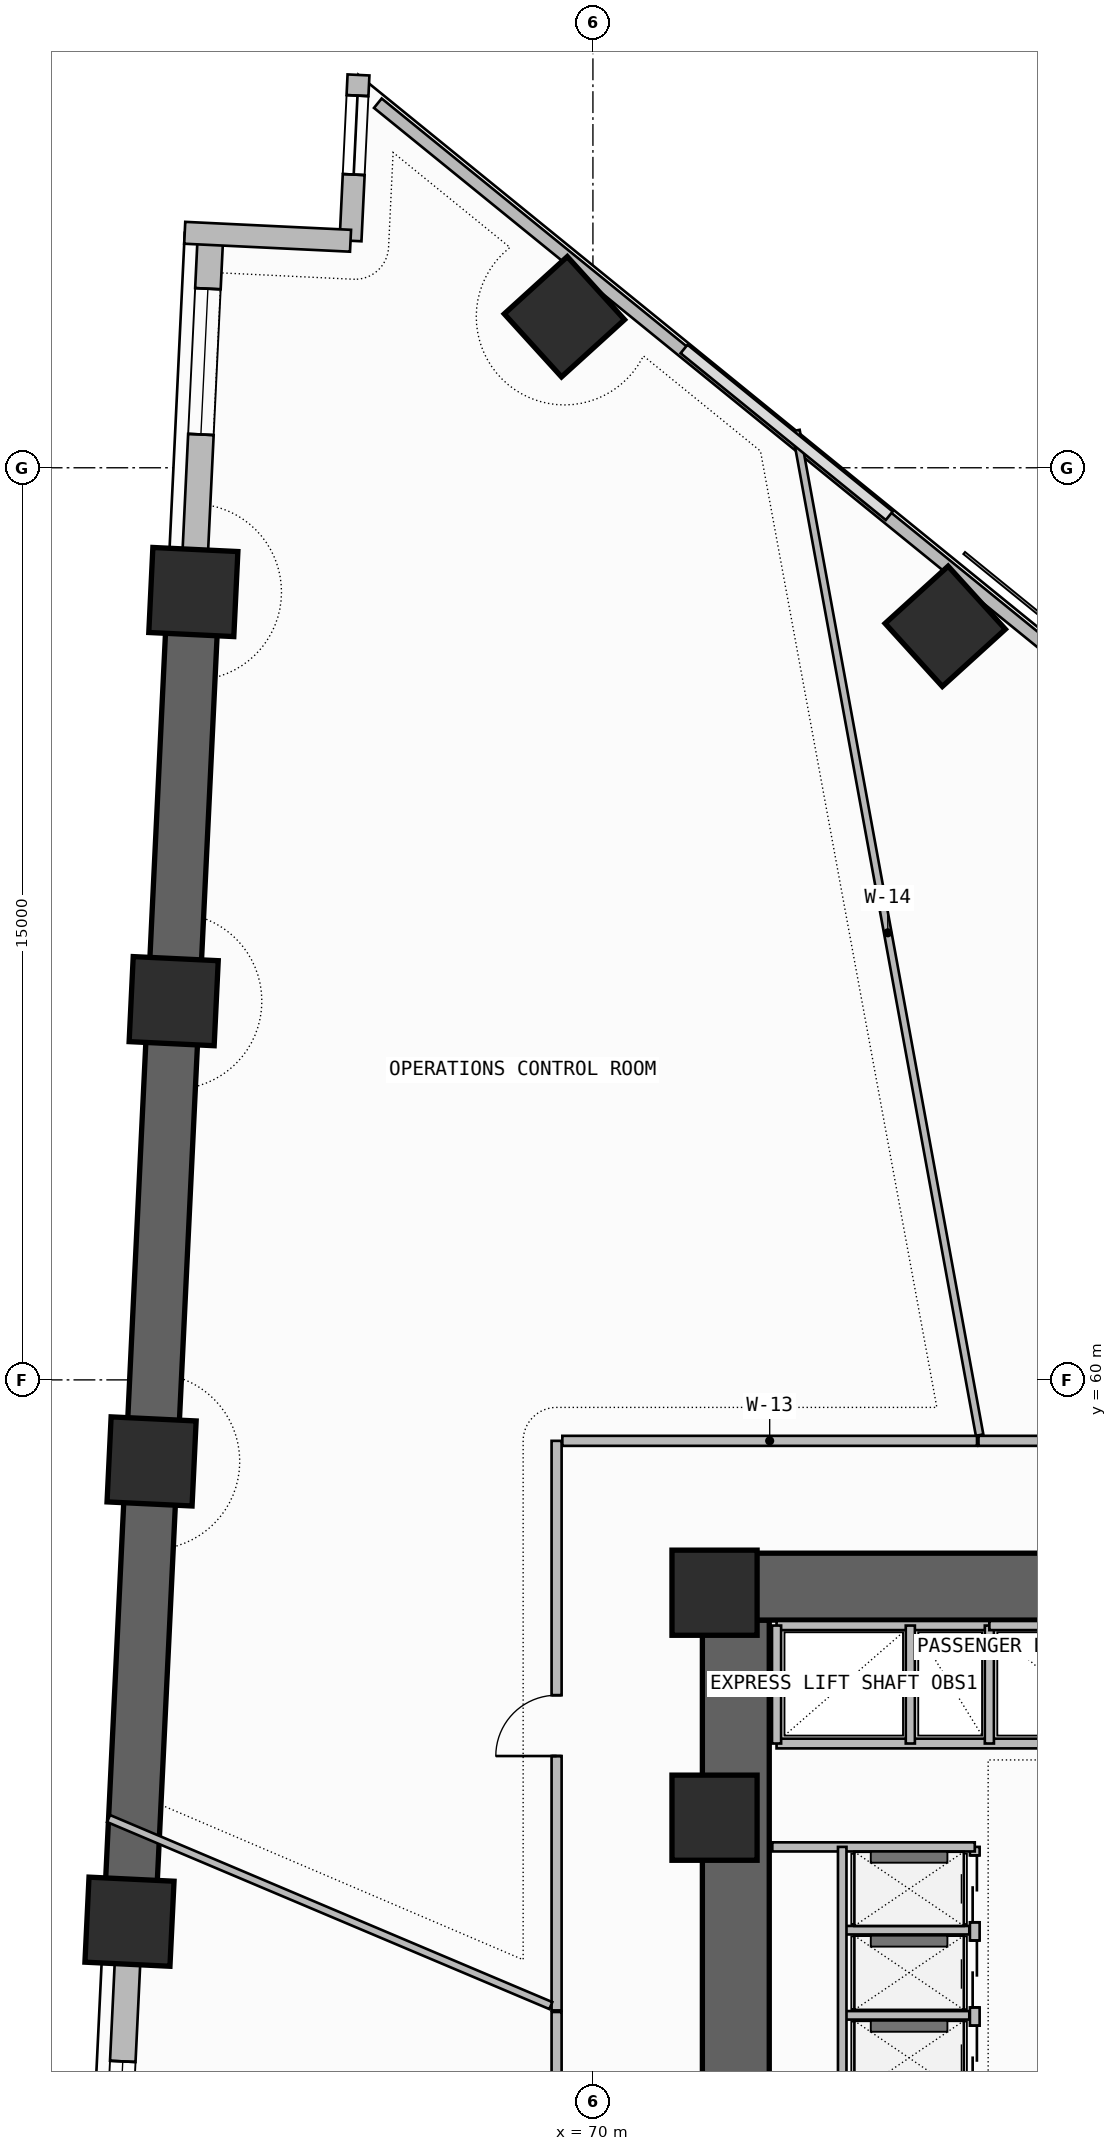
"""IFC4 building model, lengths in metres.
Left out: names, types, materials, properties, quantities, classifications, styles, units other than length and angle.
Written with IfcOpenShell. Run it as: python <this file> out.ifc"""

import sys

from ifc_helpers import new_model, si_unit, direction, frame, frame_2d, origin, origin_2d, place, context, subcontext, project, spatial, rectangle, extrude, element, fill, save


model = new_model("IFC4")
c1 = context("Model", 3, precision=1e-05, world=origin(), true_north=direction((0.0, 1.0)))
c2 = subcontext(c1, "Body", "Model", "MODEL_VIEW")
j1 = project(units=[si_unit("LENGTHUNIT", "METRE"), si_unit("PLANEANGLEUNIT", "RADIAN")], contexts=[c1])
p1 = place(None, origin())
s1 = spatial("IfcSite", under=j1, at=p1, CompositionType="ELEMENT")
p2 = place(p1, origin())
s2 = spatial("IfcBuilding", under=s1, at=p2, CompositionType="ELEMENT")
p3 = place(p2, frame((0.0, 0.0, 30.3)))
s3 = spatial("IfcBuildingStorey", under=s2, at=p3, CompositionType="ELEMENT", Elevation=30.3)
p4 = place(p3, frame((72.35, 43.35, -0.2), z_axis=(0.0, 0.0, 1.0), x_axis=(0.0, 1.0, 0.0)))
e1 = element("IfcWall", 1, at=p4, inside=s3, PredefinedType="SHEAR", context=c2, shape_type="SweptSolid", body=[
    extrude(rectangle(XDim=12.7, YDim=1.1, at=frame_2d((6.35, 0.0))), origin(), (0.0, 0.0, 1.0), 3.6),
])
p5 = place(p4, frame((1.35, 0.0, 0.2)))
e2 = element("IfcOpeningElement", 2, at=p5, cuts=e1, PredefinedType="OPENING", context=c2, shape_type="SweptSolid", body=[
    extrude(rectangle(XDim=1.2, YDim=2.2, at=frame_2d((0.6, 1.1))), frame((0.0, 0.56, 0.0), z_axis=(0.0, -1.0, 0.0), x_axis=(1.0, 0.0, 0.0)), (0.0, 0.0, 1.0), 1.12),
])
p6 = place(p3, frame((71.8, 56.6, -0.2), z_axis=(0.0, 0.0, 1.0), x_axis=(1.0, 0.0, 0.0)))
e3 = element("IfcWall", 3, at=p6, inside=s3, PredefinedType="SHEAR", context=c2, shape_type="SweptSolid", body=[
    extrude(rectangle(XDim=14.3, YDim=1.1, at=frame_2d((7.15, 0.0))), origin(), (0.0, 0.0, 1.0), 3.6),
])
for number, where, z_axis, x_axis in (
    (4, (72.0, 52.8, 0.0), (0.0, 0.0, 1.0), (1.0, 0.0, 0.0)),
    (5, (72.0, 56.5, 0.0), (0.0, 0.0, 1.0), (1.0, 0.0, 0.0)),
    (6, (75.794, 72.392, 0.0), (0.0, 0.0, 1.0), (0.74, 0.672, 0.0)),
    (7, (69.531, 77.483, 0.0), (0.0, 0.0, 1.0), (0.74, 0.672, 0.0)),
    (8, (63.428, 72.957, 0.0), (0.0, 0.0, 1.0), (0.048, 0.999, 0.0)),
    (9, (63.105, 66.228, 0.0), (0.0, 0.0, 1.0), (0.048, 0.999, 0.0)),
    (10, (62.742, 58.659, 0.0), (0.0, 0.0, 1.0), (0.048, 0.999, 0.0)),
    (11, (62.378, 51.09, 0.0), (0.0, 0.0, 1.0), (0.048, 0.999, 0.0)),
):
    element("IfcColumn", number, at=place(p3, frame(where, z_axis=z_axis, x_axis=x_axis)), inside=s3, PredefinedType="COLUMN", context=c2, shape_type="SweptSolid", body=[
        extrude(rectangle(XDim=1.4, YDim=1.4, at=origin_2d()), origin(), (0.0, 0.0, 1.0), 3.6),
    ])
p7 = place(p3, frame((63.711, 78.844, 0.0), z_axis=(0.0, 0.0, 1.0), x_axis=(-0.048007946398, -0.998846953784, 0.0)))
e12 = element("IfcWall", 12, at=p7, inside=s3, PredefinedType="SOLIDWALL", context=c2, shape_type="SweptSolid", body=[
    extrude(rectangle(XDim=5.894, YDim=0.42, at=frame_2d((2.947, 0.0))), origin(), (0.0, 0.0, 1.0), 2.385),
])
p8 = place(p7, frame((0.9, 0.0, 1.2)))
e13 = element("IfcOpeningElement", 13, at=p8, cuts=e12, PredefinedType="OPENING", context=c2, shape_type="SweptSolid", body=[
    extrude(rectangle(XDim=2.4, YDim=0.9, at=frame_2d((1.2, 0.45))), frame((0.0, 0.22, 0.0), z_axis=(0.0, -1.0, 0.0), x_axis=(1.0, 0.0, 0.0)), (0.0, 0.0, 1.0), 0.44),
])
p9 = place(p3, frame((63.428, 72.957, -0.2), z_axis=(0.0, 0.0, 1.0), x_axis=(-0.047976309476, -0.998848473858, 0.0)))
e14 = element("IfcWall", 14, at=p9, inside=s3, PredefinedType="SHEAR", context=c2, shape_type="SweptSolid", body=[
    extrude(rectangle(XDim=21.892, YDim=0.85, at=frame_2d((10.946, 0.0))), origin(), (0.0, 0.0, 1.0), 3.6),
])
p10 = place(p3, frame((62.378, 51.09, 0.0), z_axis=(0.0, 0.0, 1.0), x_axis=(-0.047978424452, -0.99884837227, 0.0)))
e15 = element("IfcWall", 15, at=p10, inside=s3, PredefinedType="SOLIDWALL", context=c2, shape_type="SweptSolid", body=[
    extrude(rectangle(XDim=14.314, YDim=0.42, at=frame_2d((7.157, 0.0))), origin(), (0.0, 0.0, 1.0), 2.385),
])
p11 = place(p10, frame((2.3, 0.0, 1.2)))
e16 = element("IfcOpeningElement", 16, at=p11, cuts=e15, PredefinedType="OPENING", context=c2, shape_type="SweptSolid", body=[
    extrude(rectangle(XDim=2.4, YDim=0.9, at=frame_2d((1.2, 0.45))), frame((0.0, 0.22, 0.0), z_axis=(0.0, -1.0, 0.0), x_axis=(1.0, 0.0, 0.0)), (0.0, 0.0, 1.0), 0.44),
])
p12 = place(p3, frame((66.144, 81.46, 0.0), z_axis=(0.0, 0.0, 1.0), x_axis=(-0.047934806162, -0.998850466465, 0.0)))
e17 = element("IfcWall", 17, at=p12, inside=s3, PredefinedType="SOLIDWALL", context=c2, shape_type="SweptSolid", body=[
    extrude(rectangle(XDim=2.73, YDim=0.36, at=frame_2d((1.365, 0.0))), origin(), (0.0, 0.0, 1.0), 3.4),
])
p13 = place(p12, frame((0.34, 0.0, 0.45)))
e18 = element("IfcOpeningElement", 18, at=p13, cuts=e17, PredefinedType="OPENING", context=c2, shape_type="SweptSolid", body=[
    extrude(rectangle(XDim=1.3, YDim=2.4, at=frame_2d((0.65, 1.2))), frame((0.0, 0.19, 0.0), z_axis=(0.0, -1.0, 0.0), x_axis=(1.0, 0.0, 0.0)), (0.0, 0.0, 1.0), 0.38),
])
p14 = place(p3, frame((66.013, 78.733, 0.0), z_axis=(0.0, 0.0, 1.0), x_axis=(-0.998846180588, 0.048024030708, 0.0)))
e19 = element("IfcWall", 19, at=p14, inside=s3, PredefinedType="SOLIDWALL", context=c2, shape_type="SweptSolid", body=[
    extrude(rectangle(XDim=2.73, YDim=0.36, at=frame_2d((1.365, 0.0))), origin(), (0.0, 0.0, 1.0), 3.4),
])
p15 = place(p3, frame((94.513, 58.196, 0.0), z_axis=(0.0, 0.0, 1.0), x_axis=(-0.776001602097, 0.630730935933, 0.0)))
e20 = element("IfcWall", 20, at=p15, inside=s3, PredefinedType="PARAPET", context=c2, shape_type="SweptSolid", body=[
    extrude(rectangle(XDim=36.148, YDim=0.2, at=frame_2d((18.074, 0.0))), origin(), (0.0, 0.0, 1.0), 1.15),
])
p16 = place(p3, frame((76.28, 47.18, 0.0), z_axis=(0.0, 0.0, 1.0), x_axis=(0.0, 1.0, 0.0)))
e21 = element("IfcWall", 21, at=p16, inside=s3, PredefinedType="SOLIDWALL", context=c2, shape_type="SweptSolid", body=[
    extrude(rectangle(XDim=5.14, YDim=0.16, at=frame_2d((2.57, 0.0))), origin(), (0.0, 0.0, 1.0), 3.4),
])
p17 = place(p16, frame((1.1, 0.0, 0.0)))
e22 = element("IfcOpeningElement", 22, at=p17, cuts=e21, PredefinedType="OPENING", context=c2, shape_type="SweptSolid", body=[
    extrude(rectangle(XDim=1.1, YDim=2.25, at=frame_2d((0.55, 1.125))), frame((0.0, 0.09, 0.0), z_axis=(0.0, -1.0, 0.0), x_axis=(1.0, 0.0, 0.0)), (0.0, 0.0, 1.0), 0.18),
])
p18 = place(p16, frame((2.5, 0.0, 0.0)))
e23 = element("IfcOpeningElement", 23, at=p18, cuts=e21, PredefinedType="OPENING", context=c2, shape_type="SweptSolid", body=[
    extrude(rectangle(XDim=1.1, YDim=2.25, at=frame_2d((0.55, 1.125))), frame((0.0, 0.09, 0.0), z_axis=(0.0, -1.0, 0.0), x_axis=(1.0, 0.0, 0.0)), (0.0, 0.0, 1.0), 0.18),
])
p19 = place(p16, frame((3.9, 0.0, 0.0)))
e24 = element("IfcOpeningElement", 24, at=p19, cuts=e21, PredefinedType="OPENING", context=c2, shape_type="SweptSolid", body=[
    extrude(rectangle(XDim=1.1, YDim=2.25, at=frame_2d((0.55, 1.125))), frame((0.0, 0.09, 0.0), z_axis=(0.0, -1.0, 0.0), x_axis=(1.0, 0.0, 0.0)), (0.0, 0.0, 1.0), 0.18),
])
p20 = place(p16, frame((0.12, 0.0, 0.0)))
e25 = element("IfcOpeningElement", 25, at=p20, cuts=e21, PredefinedType="OPENING", context=c2, shape_type="SweptSolid", body=[
    extrude(rectangle(XDim=0.85, YDim=2.05, at=frame_2d((0.425, 1.025))), frame((0.0, 0.09, 0.0), z_axis=(0.0, -1.0, 0.0), x_axis=(1.0, 0.0, 0.0)), (0.0, 0.0, 1.0), 0.18),
])
p21 = place(p3, frame((72.95, 52.32, 0.0), z_axis=(0.0, 0.0, 1.0), x_axis=(1.0, 0.0, 0.0)))
e26 = element("IfcWall", 26, at=p21, inside=s3, PredefinedType="SOLIDWALL", context=c2, shape_type="SweptSolid", body=[
    extrude(rectangle(XDim=3.33, YDim=0.15, at=frame_2d((1.665, 0.0))), origin(), (0.0, 0.0, 1.0), 3.4),
])
for number, where, z_axis, x_axis in (
    (27, (74.15, 49.55, 0.0), (0.0, 0.0, 1.0), (1.0, 0.0, 0.0)),
    (28, (74.15, 50.95, 0.0), (0.0, 0.0, 1.0), (1.0, 0.0, 0.0)),
):
    element("IfcWall", number, at=place(p3, frame(where, z_axis=z_axis, x_axis=x_axis)), inside=s3, PredefinedType="PLUMBINGWALL", context=c2, shape_type="SweptSolid", body=[
        extrude(rectangle(XDim=2.04, YDim=0.14, at=frame_2d((1.02, 0.0))), origin(), (0.0, 0.0, 1.0), 3.4),
    ])
p22 = place(p3, frame((74.1, 48.16, 0.0), z_axis=(0.0, 0.0, 1.0), x_axis=(0.0, 1.0, 0.0)))
e29 = element("IfcWall", 29, at=p22, inside=s3, PredefinedType="PLUMBINGWALL", context=c2, shape_type="SweptSolid", body=[
    extrude(rectangle(XDim=4.16, YDim=0.14, at=frame_2d((2.08, 0.0))), origin(), (0.0, 0.0, 1.0), 3.4),
])
p23 = place(p3, frame((73.02, 54.02, 0.0), z_axis=(0.0, 0.0, 1.0), x_axis=(1.0, 0.0, 0.0)))
e30 = element("IfcWall", 30, at=p23, inside=s3, PredefinedType="SOLIDWALL", context=c2, shape_type="SweptSolid", body=[
    extrude(rectangle(XDim=12.08, YDim=0.16, at=frame_2d((6.04, 0.0))), origin(), (0.0, 0.0, 1.0), 3.4),
])
p24 = place(p3, frame((73.02, 55.96, 0.0), z_axis=(0.0, 0.0, 1.0), x_axis=(1.0, 0.0, 0.0)))
e31 = element("IfcWall", 31, at=p24, inside=s3, PredefinedType="SOLIDWALL", context=c2, shape_type="SweptSolid", body=[
    extrude(rectangle(XDim=3.5, YDim=0.15, at=frame_2d((1.75, 0.0))), origin(), (0.0, 0.0, 1.0), 3.4),
])
p25 = place(p3, frame((73.02, 54.02, 0.0), z_axis=(0.0, 0.0, 1.0), x_axis=(0.0, 1.0, 0.0)))
e32 = element("IfcWall", 32, at=p25, inside=s3, PredefinedType="PLUMBINGWALL", context=c2, shape_type="SweptSolid", body=[
    extrude(rectangle(XDim=1.94, YDim=0.15, at=frame_2d((0.97, 0.0))), origin(), (0.0, 0.0, 1.0), 3.4),
])
p26 = place(p3, frame((76.52, 54.02, 0.0), z_axis=(0.0, 0.0, 1.0), x_axis=(0.0, 1.0, 0.0)))
e33 = element("IfcWall", 33, at=p26, inside=s3, PredefinedType="SOLIDWALL", context=c2, shape_type="SweptSolid", body=[
    extrude(rectangle(XDim=1.94, YDim=0.15, at=frame_2d((0.97, 0.0))), origin(), (0.0, 0.0, 1.0), 3.4),
])
p27 = place(p3, frame((75.22, 54.02, 0.0), z_axis=(0.0, 0.0, 1.0), x_axis=(0.0, 1.0, 0.0)))
e34 = element("IfcWall", 34, at=p27, inside=s3, PredefinedType="PLUMBINGWALL", context=c2, shape_type="SweptSolid", body=[
    extrude(rectangle(XDim=1.94, YDim=0.15, at=frame_2d((0.97, 0.0))), origin(), (0.0, 0.0, 1.0), 3.4),
])
p28 = place(p3, frame((76.52, 55.96, 0.0), z_axis=(0.0, 0.0, 1.0), x_axis=(1.0, 0.0, 0.0)))
e35 = element("IfcWall", 35, at=p28, inside=s3, PredefinedType="SOLIDWALL", context=c2, shape_type="SweptSolid", body=[
    extrude(rectangle(XDim=6.7, YDim=0.15, at=frame_2d((3.35, 0.0))), origin(), (0.0, 0.0, 1.0), 3.4),
])
p29 = place(p3, frame((85.598, 58.998, 0.0), z_axis=(0.0, 0.0, 1.0), x_axis=(-1.0, 0.0, 0.0)))
e36 = element("IfcWall", 36, at=p29, inside=s3, PredefinedType="PARTITIONING", context=c2, shape_type="SweptSolid", body=[
    extrude(rectangle(XDim=9.257, YDim=0.165, at=frame_2d((4.628, 0.0))), origin(), (0.0, 0.0, 1.0), 2.785),
])
p30 = place(p29, frame((4.128, 0.0, 0.0)))
e37 = element("IfcOpeningElement", 37, at=p30, cuts=e36, PredefinedType="OPENING", context=c2, shape_type="SweptSolid", body=[
    extrude(rectangle(XDim=1.0, YDim=2.2, at=frame_2d((0.5, 1.1))), frame((0.0, 0.093, 0.0), z_axis=(0.0, -1.0, 0.0), x_axis=(1.0, 0.0, 0.0)), (0.0, 0.0, 1.0), 0.185),
])
p31 = place(p3, frame((76.36, 59.092, 0.0), z_axis=(0.0, 0.0, 1.0), x_axis=(-0.179880606562, 0.983688450366, 0.0)))
e38 = element("IfcWall", 38, at=p31, inside=s3, PredefinedType="PARTITIONING", context=c2, shape_type="SweptSolid", body=[
    extrude(rectangle(XDim=16.794, YDim=0.125, at=frame_2d((8.397, 0.0))), origin(), (0.0, 0.0, 1.0), 2.785),
])
p32 = place(p3, frame((69.403, 58.998, 0.0), z_axis=(0.0, 0.0, 1.0), x_axis=(0.0, -1.0, 0.0)))
e39 = element("IfcWall", 39, at=p32, inside=s3, PredefinedType="PARTITIONING", context=c2, shape_type="SweptSolid", body=[
    extrude(rectangle(XDim=9.366, YDim=0.165, at=frame_2d((4.683, 0.0))), origin(), (0.0, 0.0, 1.0), 2.785),
])
p33 = place(p32, frame((4.183, 0.0, 0.0)))
e40 = element("IfcOpeningElement", 40, at=p33, cuts=e39, PredefinedType="OPENING", context=c2, shape_type="SweptSolid", body=[
    extrude(rectangle(XDim=1.0, YDim=2.2, at=frame_2d((0.5, 1.1))), frame((0.0, 0.093, 0.0), z_axis=(0.0, -1.0, 0.0), x_axis=(1.0, 0.0, 0.0)), (0.0, 0.0, 1.0), 0.185),
])
p34 = place(p3, frame((76.317, 58.998, 0.0), z_axis=(0.0, 0.0, 1.0), x_axis=(-1.0, 0.0, 0.0)))
e41 = element("IfcWall", 41, at=p34, inside=s3, PredefinedType="PARTITIONING", context=c2, shape_type="SweptSolid", body=[
    extrude(rectangle(XDim=6.82, YDim=0.165, at=frame_2d((3.41, 0.0))), origin(), (0.0, 0.0, 1.0), 2.785),
])
p35 = place(p3, frame((69.308, 49.71, 0.0), z_axis=(0.0, 0.0, 1.0), x_axis=(-0.921029102653, 0.389493763834, 0.0)))
e42 = element("IfcWall", 42, at=p35, inside=s3, PredefinedType="PARTITIONING", context=c2, shape_type="SweptSolid", body=[
    extrude(rectangle(XDim=7.898, YDim=0.125, at=frame_2d((3.949, 0.0))), origin(), (0.0, 0.0, 1.0), 2.385),
])
p36 = place(p3, frame((69.403, 49.605, 0.0), z_axis=(0.0, 0.0, 1.0), x_axis=(0.0, -1.0, 0.0)))
e43 = element("IfcWall", 43, at=p36, inside=s3, PredefinedType="PARTITIONING", context=c2, shape_type="SweptSolid", body=[
    extrude(rectangle(XDim=6.379, YDim=0.165, at=frame_2d((3.19, 0.0))), origin(), (0.0, 0.0, 1.0), 3.4),
])
p37 = place(p36, frame((2.69, 0.0, 0.0)))
e44 = element("IfcOpeningElement", 44, at=p37, cuts=e43, PredefinedType="OPENING", context=c2, shape_type="SweptSolid", body=[
    extrude(rectangle(XDim=1.0, YDim=2.2, at=frame_2d((0.5, 1.1))), frame((0.0, 0.093, 0.0), z_axis=(0.0, -1.0, 0.0), x_axis=(1.0, 0.0, 0.0)), (0.0, 0.0, 1.0), 0.185),
])
p38 = place(p8, origin())
e45 = element("IfcWindow", 45, at=p38, inside=s3, PartitioningType="SINGLE_PANEL", PredefinedType="WINDOW", context=c2, shape_type="SweptSolid", body=[
    extrude(rectangle(XDim=2.4, YDim=0.9, at=frame_2d((1.2, 0.45))), frame((0.0, 0.03, 0.0), z_axis=(0.0, -1.0, 0.0), x_axis=(1.0, 0.0, 0.0)), (0.0, 0.0, 1.0), 0.06),
])
fill(e13, e45)
p39 = place(p11, origin())
e46 = element("IfcWindow", 46, at=p39, inside=s3, PartitioningType="SINGLE_PANEL", PredefinedType="WINDOW", context=c2, shape_type="SweptSolid", body=[
    extrude(rectangle(XDim=2.4, YDim=0.9, at=frame_2d((1.2, 0.45))), frame((0.0, 0.03, 0.0), z_axis=(0.0, -1.0, 0.0), x_axis=(1.0, 0.0, 0.0)), (0.0, 0.0, 1.0), 0.06),
])
fill(e16, e46)
p40 = place(p13, origin())
e47 = element("IfcWindow", 47, at=p40, inside=s3, PartitioningType="SINGLE_PANEL", PredefinedType="WINDOW", context=c2, shape_type="SweptSolid", body=[
    extrude(rectangle(XDim=1.3, YDim=2.4, at=frame_2d((0.65, 1.2))), frame((0.0, 0.03, 0.0), z_axis=(0.0, -1.0, 0.0), x_axis=(1.0, 0.0, 0.0)), (0.0, 0.0, 1.0), 0.06),
])
fill(e18, e47)
p41 = place(p17, origin())
e48 = element("IfcDoor", 48, at=p41, inside=s3, OperationType="DOUBLE_DOOR_SLIDING", PredefinedType="DOOR", context=c2, shape_type="SweptSolid", body=[
    extrude(rectangle(XDim=1.1, YDim=2.25, at=frame_2d((0.55, 1.125))), frame((0.0, 0.025, 0.0), z_axis=(0.0, -1.0, 0.0), x_axis=(1.0, 0.0, 0.0)), (0.0, 0.0, 1.0), 0.05),
])
fill(e22, e48)
p42 = place(p18, origin())
e49 = element("IfcDoor", 49, at=p42, inside=s3, OperationType="DOUBLE_DOOR_SLIDING", PredefinedType="DOOR", context=c2, shape_type="SweptSolid", body=[
    extrude(rectangle(XDim=1.1, YDim=2.25, at=frame_2d((0.55, 1.125))), frame((0.0, 0.025, 0.0), z_axis=(0.0, -1.0, 0.0), x_axis=(1.0, 0.0, 0.0)), (0.0, 0.0, 1.0), 0.05),
])
fill(e23, e49)
p43 = place(p19, origin())
e50 = element("IfcDoor", 50, at=p43, inside=s3, OperationType="DOUBLE_DOOR_SLIDING", PredefinedType="DOOR", context=c2, shape_type="SweptSolid", body=[
    extrude(rectangle(XDim=1.1, YDim=2.25, at=frame_2d((0.55, 1.125))), frame((0.0, 0.025, 0.0), z_axis=(0.0, -1.0, 0.0), x_axis=(1.0, 0.0, 0.0)), (0.0, 0.0, 1.0), 0.05),
])
fill(e24, e50)
p44 = place(p33, frame((1.0, 0.0, 0.0), z_axis=(0.0, 0.0, 1.0), x_axis=(-1.0, 0.0, 0.0)))
e51 = element("IfcDoor", 51, at=p44, inside=s3, OperationType="SINGLE_SWING_LEFT", PredefinedType="DOOR", context=c2, shape_type="SweptSolid", body=[
    extrude(rectangle(XDim=1.0, YDim=2.2, at=frame_2d((0.5, 1.1))), frame((0.0, 0.025, 0.0), z_axis=(0.0, -1.0, 0.0), x_axis=(1.0, 0.0, 0.0)), (0.0, 0.0, 1.0), 0.05),
])
fill(e40, e51)
save(model, sys.argv[1])
